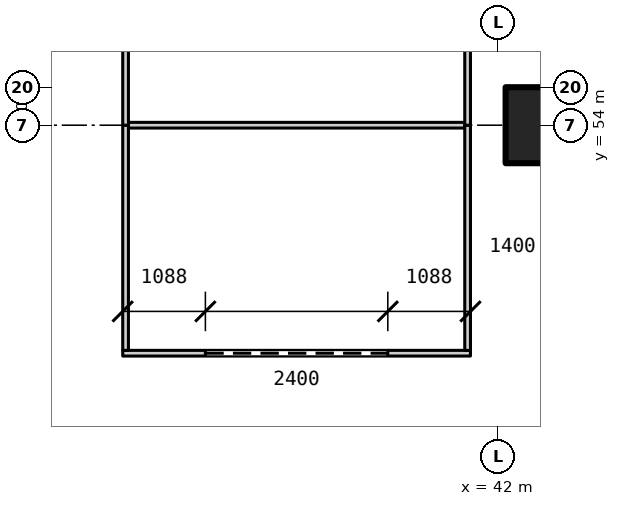
"""IFC4 building model, lengths in metres.
Left out: names, types, materials, properties, quantities, classifications, styles, units other than length and angle.
Written with IfcOpenShell. Run it as: python <this file> out.ifc"""

import sys

from ifc_helpers import new_model, si_unit, direction, frame, frame_2d, origin, origin_2d, place, context, subcontext, project, spatial, rectangle, extrude, element, fill, save


model = new_model("IFC4")
c1 = context("Model", 3, precision=1e-05, world=origin(), true_north=direction((0.0, 1.0)))
c2 = subcontext(c1, "Body", "Model", "MODEL_VIEW")
j1 = project(units=[si_unit("LENGTHUNIT", "METRE"), si_unit("PLANEANGLEUNIT", "RADIAN")], contexts=[c1])
p1 = place(None, origin())
s1 = spatial("IfcSite", under=j1, at=p1, CompositionType="ELEMENT")
p2 = place(p1, origin())
s2 = spatial("IfcBuilding", under=s1, at=p2, CompositionType="ELEMENT")
p3 = place(p2, origin())
s3 = spatial("IfcBuildingStorey", under=s2, at=p3, CompositionType="ELEMENT", Elevation=0.0)
p4 = place(p3, frame((43.0, 54.0, 0.0), z_axis=(0.0, 0.0, 1.0), x_axis=(1.0, 0.0, 0.0)))
e1 = element("IfcColumn", 1, at=p4, inside=s3, PredefinedType="COLUMN", context=c2, shape_type="SweptSolid", body=[
    extrude(rectangle(XDim=1.8, YDim=1.0, at=origin_2d()), origin(), (0.0, 0.0, 1.0), 6.0),
])
p5 = place(p3, frame((37.062, 51.0, 0.0), z_axis=(0.0, 0.0, 1.0), x_axis=(1.0, 0.0, 0.0)))
e2 = element("IfcWall", 2, at=p5, inside=s3, PredefinedType="PARTITIONING", context=c2, shape_type="SweptSolid", body=[
    extrude(rectangle(XDim=4.575, YDim=0.075, at=frame_2d((2.288, 0.0))), origin(), (0.0, 0.0, 1.0), 3.0),
])
p6 = place(p5, frame((1.087, 0.0, 0.0)))
e3 = element("IfcOpeningElement", 3, at=p6, cuts=e2, PredefinedType="OPENING", context=c2, shape_type="SweptSolid", body=[
    extrude(rectangle(XDim=2.4, YDim=2.4, at=frame_2d((1.2, 1.2))), frame((0.0, 0.047, 0.0), z_axis=(0.0, -1.0, 0.0), x_axis=(1.0, 0.0, 0.0)), (0.0, 0.0, 1.0), 0.095),
])
p7 = place(p3, frame((37.137, 54.0, 0.0), z_axis=(0.0, 0.0, 1.0), x_axis=(1.0, 0.0, 0.0)))
e4 = element("IfcWall", 4, at=p7, inside=s3, PredefinedType="PARTITIONING", context=c2, shape_type="SweptSolid", body=[
    extrude(rectangle(XDim=4.425, YDim=0.075, at=frame_2d((2.212, 0.0))), origin(), (0.0, 0.0, 1.0), 3.0),
])
for number, where, z_axis, x_axis in (
    (5, (37.1, 51.038, 0.0), (0.0, 0.0, 1.0), (0.0, 1.0, 0.0)),
    (6, (37.1, 54.0, 0.0), (0.0, 0.0, 1.0), (0.0, 1.0, 0.0)),
    (7, (41.6, 51.038, 0.0), (0.0, 0.0, 1.0), (0.0, 1.0, 0.0)),
    (8, (41.6, 54.0, 0.0), (0.0, 0.0, 1.0), (0.0, 1.0, 0.0)),
):
    element("IfcWall", number, at=place(p3, frame(where, z_axis=z_axis, x_axis=x_axis)), inside=s3, PredefinedType="PARTITIONING", context=c2, shape_type="SweptSolid", body=[
        extrude(rectangle(XDim=2.962, YDim=0.075, at=frame_2d((1.481, 0.0))), origin(), (0.0, 0.0, 1.0), 3.0),
    ])
p8 = place(p6, origin())
e9 = element("IfcDoor", 9, at=p8, inside=s3, OperationType="ROLLINGUP", PredefinedType="DOOR", context=c2, shape_type="SweptSolid", body=[
    extrude(rectangle(XDim=2.4, YDim=2.4, at=frame_2d((1.2, 1.2))), frame((0.0, 0.025, 0.0), z_axis=(0.0, -1.0, 0.0), x_axis=(1.0, 0.0, 0.0)), (0.0, 0.0, 1.0), 0.05),
])
fill(e3, e9)
save(model, sys.argv[1])
